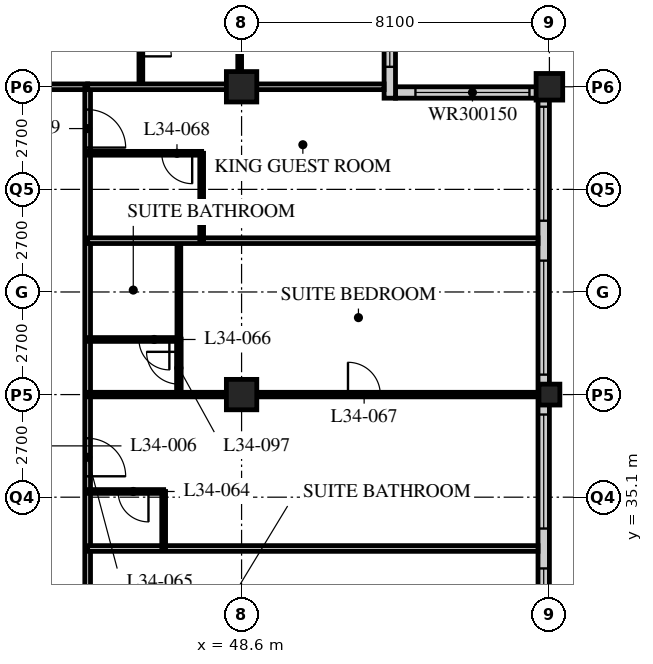
"""IFC4 building model, lengths in metres.
Left out: names, types, materials, properties, quantities, classifications, styles, units other than length and angle.
Written with IfcOpenShell. Run it as: python <this file> out.ifc"""

import sys

from ifc_helpers import new_model, si_unit, direction, frame, frame_2d, origin, origin_2d, place, context, subcontext, project, spatial, rectangle, hollow_rectangle, extrude, element, fill, save


model = new_model("IFC4")
c1 = context("Model", 3, precision=1e-05, world=origin(), true_north=direction((0.0, 1.0)))
c2 = subcontext(c1, "Body", "Model", "MODEL_VIEW")
j1 = project(units=[si_unit("LENGTHUNIT", "METRE"), si_unit("PLANEANGLEUNIT", "RADIAN")], contexts=[c1])
p1 = place(None, origin())
s1 = spatial("IfcSite", under=j1, at=p1, CompositionType="ELEMENT")
p2 = place(p1, origin())
s2 = spatial("IfcBuilding", under=s1, at=p2, CompositionType="ELEMENT")
p3 = place(p2, frame((0.0, 0.0, 134.0)))
s3 = spatial("IfcBuildingStorey", under=s2, at=p3, CompositionType="ELEMENT", Elevation=134.0)
for number, where, z_axis, x_axis in (
    (1, (48.6, 37.8, 0.0), (0.0, 0.0, 1.0), (1.0, 0.0, 0.0)),
    (2, (48.6, 45.9, 0.0), (0.0, 0.0, 1.0), (1.0, 0.0, 0.0)),
):
    element("IfcColumn", number, at=place(p3, frame(where, z_axis=z_axis, x_axis=x_axis)), inside=s3, PredefinedType="COLUMN", context=c2, shape_type="SweptSolid", body=[
        extrude(hollow_rectangle(XDim=0.8, YDim=0.8, WallThickness=0.08, at=origin_2d()), origin(), (0.0, 0.0, 1.0), 3.4),
    ])
p4 = place(p3, frame((56.7, 37.8, 0.0), z_axis=(0.0, 0.0, 1.0), x_axis=(1.0, 0.0, 0.0)))
e3 = element("IfcColumn", 3, at=p4, inside=s3, PredefinedType="COLUMN", context=c2, shape_type="SweptSolid", body=[
    extrude(hollow_rectangle(XDim=0.55, YDim=0.55, WallThickness=0.04, at=origin_2d()), origin(), (0.0, 0.0, 1.0), 3.4),
])
p5 = place(p3, frame((56.7, 45.9, 0.0), z_axis=(0.0, 0.0, 1.0), x_axis=(1.0, 0.0, 0.0)))
e4 = element("IfcColumn", 4, at=p5, inside=s3, PredefinedType="COLUMN", context=c2, shape_type="SweptSolid", body=[
    extrude(hollow_rectangle(XDim=0.7, YDim=0.7, WallThickness=0.07, at=origin_2d()), origin(), (0.0, 0.0, 1.0), 3.4),
])
p6 = place(p3, frame((56.55, 13.8, 0.0), z_axis=(0.0, 0.0, 1.0), x_axis=(0.0, 1.0, 0.0)))
e5 = element("IfcWall", 5, at=p6, inside=s3, PredefinedType="SOLIDWALL", context=c2, shape_type="SweptSolid", body=[
    extrude(rectangle(XDim=32.1, YDim=0.3, at=frame_2d((16.05, 0.0))), origin(), (0.0, 0.0, 1.0), 3.19),
])
p7 = place(p6, frame((0.225, 0.0, 0.9)))
e6 = element("IfcOpeningElement", 6, at=p7, cuts=e5, PredefinedType="OPENING", context=c2, shape_type="SweptSolid", body=[
    extrude(rectangle(XDim=3.0, YDim=2.0, at=frame_2d((1.5, 1.0))), frame((0.0, 0.16, 0.0), z_axis=(0.0, -1.0, 0.0), x_axis=(1.0, 0.0, 0.0)), (0.0, 0.0, 1.0), 0.32),
])
p8 = place(p6, frame((4.275, 0.0, 0.9)))
e7 = element("IfcOpeningElement", 7, at=p8, cuts=e5, PredefinedType="OPENING", context=c2, shape_type="SweptSolid", body=[
    extrude(rectangle(XDim=3.0, YDim=2.0, at=frame_2d((1.5, 1.0))), frame((0.0, 0.16, 0.0), z_axis=(0.0, -1.0, 0.0), x_axis=(1.0, 0.0, 0.0)), (0.0, 0.0, 1.0), 0.32),
])
p9 = place(p6, frame((8.325, 0.0, 0.9)))
e8 = element("IfcOpeningElement", 8, at=p9, cuts=e5, PredefinedType="OPENING", context=c2, shape_type="SweptSolid", body=[
    extrude(rectangle(XDim=3.0, YDim=2.0, at=frame_2d((1.5, 1.0))), frame((0.0, 0.16, 0.0), z_axis=(0.0, -1.0, 0.0), x_axis=(1.0, 0.0, 0.0)), (0.0, 0.0, 1.0), 0.32),
])
p10 = place(p6, frame((12.375, 0.0, 0.9)))
e9 = element("IfcOpeningElement", 9, at=p10, cuts=e5, PredefinedType="OPENING", context=c2, shape_type="SweptSolid", body=[
    extrude(rectangle(XDim=3.0, YDim=2.0, at=frame_2d((1.5, 1.0))), frame((0.0, 0.16, 0.0), z_axis=(0.0, -1.0, 0.0), x_axis=(1.0, 0.0, 0.0)), (0.0, 0.0, 1.0), 0.32),
])
p11 = place(p6, frame((16.425, 0.0, 0.9)))
e10 = element("IfcOpeningElement", 10, at=p11, cuts=e5, PredefinedType="OPENING", context=c2, shape_type="SweptSolid", body=[
    extrude(rectangle(XDim=3.0, YDim=2.0, at=frame_2d((1.5, 1.0))), frame((0.0, 0.16, 0.0), z_axis=(0.0, -1.0, 0.0), x_axis=(1.0, 0.0, 0.0)), (0.0, 0.0, 1.0), 0.32),
])
p12 = place(p6, frame((20.475, 0.0, 0.9)))
e11 = element("IfcOpeningElement", 11, at=p12, cuts=e5, PredefinedType="OPENING", context=c2, shape_type="SweptSolid", body=[
    extrude(rectangle(XDim=3.0, YDim=2.0, at=frame_2d((1.5, 1.0))), frame((0.0, 0.16, 0.0), z_axis=(0.0, -1.0, 0.0), x_axis=(1.0, 0.0, 0.0)), (0.0, 0.0, 1.0), 0.32),
])
p13 = place(p6, frame((24.525, 0.0, 0.9)))
e12 = element("IfcOpeningElement", 12, at=p13, cuts=e5, PredefinedType="OPENING", context=c2, shape_type="SweptSolid", body=[
    extrude(rectangle(XDim=3.0, YDim=2.0, at=frame_2d((1.5, 1.0))), frame((0.0, 0.16, 0.0), z_axis=(0.0, -1.0, 0.0), x_axis=(1.0, 0.0, 0.0)), (0.0, 0.0, 1.0), 0.32),
])
p14 = place(p6, frame((28.575, 0.0, 0.9)))
e13 = element("IfcOpeningElement", 13, at=p14, cuts=e5, PredefinedType="OPENING", context=c2, shape_type="SweptSolid", body=[
    extrude(rectangle(XDim=3.0, YDim=2.0, at=frame_2d((1.5, 1.0))), frame((0.0, 0.16, 0.0), z_axis=(0.0, -1.0, 0.0), x_axis=(1.0, 0.0, 0.0)), (0.0, 0.0, 1.0), 0.32),
])
p15 = place(p3, frame((56.4, 45.75, 0.0), z_axis=(0.0, 0.0, 1.0), x_axis=(-1.0, 0.0, 0.0)))
e14 = element("IfcWall", 14, at=p15, inside=s3, PredefinedType="SOLIDWALL", context=c2, shape_type="SweptSolid", body=[
    extrude(rectangle(XDim=3.75, YDim=0.3, at=frame_2d((1.875, 0.0))), origin(), (0.0, 0.0, 1.0), 3.19),
])
p16 = place(p15, frame((0.225, 0.0, 0.9)))
e15 = element("IfcOpeningElement", 15, at=p16, cuts=e14, PredefinedType="OPENING", context=c2, shape_type="SweptSolid", body=[
    extrude(rectangle(XDim=3.0, YDim=1.5, at=frame_2d((1.5, 0.75))), frame((0.0, 0.16, 0.0), z_axis=(0.0, -1.0, 0.0), x_axis=(1.0, 0.0, 0.0)), (0.0, 0.0, 1.0), 0.32),
])
p17 = place(p3, frame((52.5, 45.6, 0.0), z_axis=(0.0, 0.0, 1.0), x_axis=(0.0, 1.0, 0.0)))
e16 = element("IfcWall", 16, at=p17, inside=s3, PredefinedType="SOLIDWALL", context=c2, shape_type="SweptSolid", body=[
    extrude(rectangle(XDim=4.35, YDim=0.3, at=frame_2d((2.175, 0.0))), origin(), (0.0, 0.0, 1.0), 3.19),
])
p18 = place(p17, frame((0.825, 0.0, 0.9)))
e17 = element("IfcOpeningElement", 17, at=p18, cuts=e16, PredefinedType="OPENING", context=c2, shape_type="SweptSolid", body=[
    extrude(rectangle(XDim=3.0, YDim=1.5, at=frame_2d((1.5, 0.75))), frame((0.0, 0.16, 0.0), z_axis=(0.0, -1.0, 0.0), x_axis=(1.0, 0.0, 0.0)), (0.0, 0.0, 1.0), 0.32),
])
p19 = place(p3, frame((8.1, 45.9, 0.0), z_axis=(0.0, 0.0, 1.0), x_axis=(1.0, 0.0, 0.0)))
e18 = element("IfcWall", 18, at=p19, inside=s3, PredefinedType="PARTITIONING", context=c2, shape_type="SweptSolid", body=[
    extrude(rectangle(XDim=36.45, YDim=0.15, at=frame_2d((18.225, 0.0))), origin(), (0.0, 0.0, 1.0), 2.578),
])
p20 = place(p19, frame((9.625, 0.0, 0.0)))
e19 = element("IfcOpeningElement", 19, at=p20, cuts=e18, PredefinedType="OPENING", context=c2, shape_type="SweptSolid", body=[
    extrude(rectangle(XDim=1.0, YDim=2.1, at=frame_2d((0.5, 1.05))), frame((0.0, 0.085, 0.0), z_axis=(0.0, -1.0, 0.0), x_axis=(1.0, 0.0, 0.0)), (0.0, 0.0, 1.0), 0.17),
])
p21 = place(p19, frame((21.775, 0.0, 0.0)))
e20 = element("IfcOpeningElement", 20, at=p21, cuts=e18, PredefinedType="OPENING", context=c2, shape_type="SweptSolid", body=[
    extrude(rectangle(XDim=1.0, YDim=2.1, at=frame_2d((0.5, 1.05))), frame((0.0, 0.085, 0.0), z_axis=(0.0, -1.0, 0.0), x_axis=(1.0, 0.0, 0.0)), (0.0, 0.0, 1.0), 0.17),
])
p22 = place(p19, frame((28.95, 0.0, 0.0)))
e21 = element("IfcOpeningElement", 21, at=p22, cuts=e18, PredefinedType="OPENING", context=c2, shape_type="SweptSolid", body=[
    extrude(rectangle(XDim=1.0, YDim=2.1, at=frame_2d((0.5, 1.05))), frame((0.0, 0.085, 0.0), z_axis=(0.0, -1.0, 0.0), x_axis=(1.0, 0.0, 0.0)), (0.0, 0.0, 1.0), 0.17),
])
p23 = place(p19, frame((33.925, 0.0, 0.0)))
e22 = element("IfcOpeningElement", 22, at=p23, cuts=e18, PredefinedType="OPENING", context=c2, shape_type="SweptSolid", body=[
    extrude(rectangle(XDim=1.0, YDim=2.1, at=frame_2d((0.5, 1.05))), frame((0.0, 0.085, 0.0), z_axis=(0.0, -1.0, 0.0), x_axis=(1.0, 0.0, 0.0)), (0.0, 0.0, 1.0), 0.17),
])
p24 = place(p19, frame((2.625, 0.0, 0.0)))
e23 = element("IfcOpeningElement", 23, at=p24, cuts=e18, PredefinedType="OPENING", context=c2, shape_type="SweptSolid", body=[
    extrude(rectangle(XDim=1.0, YDim=2.1, at=frame_2d((0.5, 1.05))), frame((0.0, 0.085, 0.0), z_axis=(0.0, -1.0, 0.0), x_axis=(1.0, 0.0, 0.0)), (0.0, 0.0, 1.0), 0.17),
])
p25 = place(p3, frame((44.55, 17.55, 0.0), z_axis=(0.0, 0.0, 1.0), x_axis=(0.0, 1.0, 0.0)))
e24 = element("IfcWall", 24, at=p25, inside=s3, PredefinedType="PARTITIONING", context=c2, shape_type="SweptSolid", body=[
    extrude(rectangle(XDim=28.35, YDim=0.15, at=frame_2d((14.175, 0.0))), origin(), (0.0, 0.0, 1.0), 3.19),
])
p26 = place(p25, frame((2.75, 0.0, 0.0)))
e25 = element("IfcOpeningElement", 25, at=p26, cuts=e24, PredefinedType="OPENING", context=c2, shape_type="SweptSolid", body=[
    extrude(rectangle(XDim=1.0, YDim=2.1, at=frame_2d((0.5, 1.05))), frame((0.0, 0.085, 0.0), z_axis=(0.0, -1.0, 0.0), x_axis=(1.0, 0.0, 0.0)), (0.0, 0.0, 1.0), 0.17),
])
p27 = place(p25, frame((6.5, 0.0, 0.0)))
e26 = element("IfcOpeningElement", 26, at=p27, cuts=e24, PredefinedType="OPENING", context=c2, shape_type="SweptSolid", body=[
    extrude(rectangle(XDim=1.0, YDim=2.1, at=frame_2d((0.5, 1.05))), frame((0.0, 0.085, 0.0), z_axis=(0.0, -1.0, 0.0), x_axis=(1.0, 0.0, 0.0)), (0.0, 0.0, 1.0), 0.17),
])
p28 = place(p25, frame((13.55, 0.0, 0.0)))
e27 = element("IfcOpeningElement", 27, at=p28, cuts=e24, PredefinedType="OPENING", context=c2, shape_type="SweptSolid", body=[
    extrude(rectangle(XDim=1.0, YDim=2.1, at=frame_2d((0.5, 1.05))), frame((0.0, 0.085, 0.0), z_axis=(0.0, -1.0, 0.0), x_axis=(1.0, 0.0, 0.0)), (0.0, 0.0, 1.0), 0.17),
])
p29 = place(p25, frame((18.1, 0.0, 0.0)))
e28 = element("IfcOpeningElement", 28, at=p29, cuts=e24, PredefinedType="OPENING", context=c2, shape_type="SweptSolid", body=[
    extrude(rectangle(XDim=1.0, YDim=2.1, at=frame_2d((0.5, 1.05))), frame((0.0, 0.085, 0.0), z_axis=(0.0, -1.0, 0.0), x_axis=(1.0, 0.0, 0.0)), (0.0, 0.0, 1.0), 0.17),
])
p30 = place(p25, frame((26.75, 0.0, 0.0)))
e29 = element("IfcOpeningElement", 29, at=p30, cuts=e24, PredefinedType="OPENING", context=c2, shape_type="SweptSolid", body=[
    extrude(rectangle(XDim=1.0, YDim=2.1, at=frame_2d((0.5, 1.05))), frame((0.0, 0.085, 0.0), z_axis=(0.0, -1.0, 0.0), x_axis=(1.0, 0.0, 0.0)), (0.0, 0.0, 1.0), 0.17),
])
p31 = place(p3, frame((44.55, 33.75, 0.0), z_axis=(0.0, 0.0, 1.0), x_axis=(1.0, 0.0, 0.0)))
e30 = element("IfcWall", 30, at=p31, inside=s3, PredefinedType="PARTITIONING", context=c2, shape_type="SweptSolid", body=[
    extrude(rectangle(XDim=11.85, YDim=0.15, at=frame_2d((5.925, 0.0))), origin(), (0.0, 0.0, 1.0), 3.19),
])
p32 = place(p3, frame((46.55, 33.75, 0.0), z_axis=(0.0, 0.0, 1.0), x_axis=(0.0, 1.0, 0.0)))
e31 = element("IfcWall", 31, at=p32, inside=s3, PredefinedType="PARTITIONING", context=c2, shape_type="SweptSolid", body=[
    extrude(rectangle(XDim=1.5, YDim=0.1, at=frame_2d((0.75, 0.0))), origin(), (0.0, 0.0, 1.0), 3.19),
])
p33 = place(p3, frame((44.55, 35.25, 0.0), z_axis=(0.0, 0.0, 1.0), x_axis=(1.0, 0.0, 0.0)))
e32 = element("IfcWall", 32, at=p33, inside=s3, PredefinedType="PARTITIONING", context=c2, shape_type="SweptSolid", body=[
    extrude(rectangle(XDim=2.0, YDim=0.1, at=frame_2d((1.0, 0.0))), origin(), (0.0, 0.0, 1.0), 3.19),
])
p34 = place(p33, frame((0.8, 0.0, 0.0)))
e33 = element("IfcOpeningElement", 33, at=p34, cuts=e32, PredefinedType="OPENING", context=c2, shape_type="SweptSolid", body=[
    extrude(rectangle(XDim=0.8, YDim=2.1, at=frame_2d((0.4, 1.05))), frame((0.0, 0.06, 0.0), z_axis=(0.0, -1.0, 0.0), x_axis=(1.0, 0.0, 0.0)), (0.0, 0.0, 1.0), 0.12),
])
p35 = place(p3, frame((46.95, 39.25, 0.0), z_axis=(0.0, 0.0, 1.0), x_axis=(0.0, 1.0, 0.0)))
e34 = element("IfcWall", 34, at=p35, inside=s3, PredefinedType="PARTITIONING", context=c2, shape_type="SweptSolid", body=[
    extrude(rectangle(XDim=2.6, YDim=0.1, at=frame_2d((1.3, 0.0))), origin(), (0.0, 0.0, 1.0), 3.19),
])
p36 = place(p3, frame((44.55, 39.25, 0.0), z_axis=(0.0, 0.0, 1.0), x_axis=(1.0, 0.0, 0.0)))
e35 = element("IfcWall", 35, at=p36, inside=s3, PredefinedType="PARTITIONING", context=c2, shape_type="SweptSolid", body=[
    extrude(rectangle(XDim=2.4, YDim=0.1, at=frame_2d((1.2, 0.0))), origin(), (0.0, 0.0, 1.0), 3.19),
])
p37 = place(p36, frame((1.35, 0.0, 0.0)))
e36 = element("IfcOpeningElement", 36, at=p37, cuts=e35, PredefinedType="OPENING", context=c2, shape_type="SweptSolid", body=[
    extrude(rectangle(XDim=0.8, YDim=2.1, at=frame_2d((0.4, 1.05))), frame((0.0, 0.06, 0.0), z_axis=(0.0, -1.0, 0.0), x_axis=(1.0, 0.0, 0.0)), (0.0, 0.0, 1.0), 0.12),
])
p38 = place(p3, frame((44.55, 37.8, 0.0), z_axis=(0.0, 0.0, 1.0), x_axis=(1.0, 0.0, 0.0)))
e37 = element("IfcWall", 37, at=p38, inside=s3, PredefinedType="PARTITIONING", context=c2, shape_type="SweptSolid", body=[
    extrude(rectangle(XDim=11.85, YDim=0.12, at=frame_2d((5.925, 0.0))), origin(), (0.0, 0.0, 1.0), 2.578),
])
p39 = place(p38, frame((6.85, 0.0, 0.0)))
e38 = element("IfcOpeningElement", 38, at=p39, cuts=e37, PredefinedType="OPENING", context=c2, shape_type="SweptSolid", body=[
    extrude(rectangle(XDim=0.85, YDim=2.1, at=frame_2d((0.425, 1.05))), frame((0.0, 0.07, 0.0), z_axis=(0.0, -1.0, 0.0), x_axis=(1.0, 0.0, 0.0)), (0.0, 0.0, 1.0), 0.14),
])
p40 = place(p3, frame((44.55, 41.85, 0.0), z_axis=(0.0, 0.0, 1.0), x_axis=(1.0, 0.0, 0.0)))
e39 = element("IfcWall", 39, at=p40, inside=s3, PredefinedType="PARTITIONING", context=c2, shape_type="SweptSolid", body=[
    extrude(rectangle(XDim=11.85, YDim=0.15, at=frame_2d((5.925, 0.0))), origin(), (0.0, 0.0, 1.0), 3.19),
])
p41 = place(p3, frame((47.55, 41.85, 0.0), z_axis=(0.0, 0.0, 1.0), x_axis=(0.0, 1.0, 0.0)))
e40 = element("IfcWall", 40, at=p41, inside=s3, PredefinedType="PARTITIONING", context=c2, shape_type="SweptSolid", body=[
    extrude(rectangle(XDim=2.3, YDim=0.1, at=frame_2d((1.15, 0.0))), origin(), (0.0, 0.0, 1.0), 3.19),
])
p42 = place(p3, frame((44.55, 44.15, 0.0), z_axis=(0.0, 0.0, 1.0), x_axis=(1.0, 0.0, 0.0)))
e41 = element("IfcWall", 41, at=p42, inside=s3, PredefinedType="PARTITIONING", context=c2, shape_type="SweptSolid", body=[
    extrude(rectangle(XDim=3.0, YDim=0.1, at=frame_2d((1.5, 0.0))), origin(), (0.0, 0.0, 1.0), 3.19),
])
p43 = place(p42, frame((1.95, 0.0, 0.0)))
e42 = element("IfcOpeningElement", 42, at=p43, cuts=e41, PredefinedType="OPENING", context=c2, shape_type="SweptSolid", body=[
    extrude(rectangle(XDim=0.8, YDim=2.1, at=frame_2d((0.4, 1.05))), frame((0.0, 0.06, 0.0), z_axis=(0.0, -1.0, 0.0), x_axis=(1.0, 0.0, 0.0)), (0.0, 0.0, 1.0), 0.12),
])
p44 = place(p3, frame((45.95, 45.9, 0.0), z_axis=(0.0, 0.0, 1.0), x_axis=(0.0, 1.0, 0.0)))
e43 = element("IfcWall", 43, at=p44, inside=s3, PredefinedType="PARTITIONING", context=c2, shape_type="SweptSolid", body=[
    extrude(rectangle(XDim=2.4, YDim=0.1, at=frame_2d((1.2, 0.0))), origin(), (0.0, 0.0, 1.0), 3.19),
])
p45 = place(p44, frame((0.8, 0.0, 0.0)))
e44 = element("IfcOpeningElement", 44, at=p45, cuts=e43, PredefinedType="OPENING", context=c2, shape_type="SweptSolid", body=[
    extrude(rectangle(XDim=0.8, YDim=2.1, at=frame_2d((0.4, 1.05))), frame((0.0, 0.06, 0.0), z_axis=(0.0, -1.0, 0.0), x_axis=(1.0, 0.0, 0.0)), (0.0, 0.0, 1.0), 0.12),
])
p46 = place(p3, frame((48.55, 45.9, 0.0), z_axis=(0.0, 0.0, 1.0), x_axis=(0.0, 1.0, 0.0)))
e45 = element("IfcWall", 45, at=p46, inside=s3, PredefinedType="PARTITIONING", context=c2, shape_type="SweptSolid", body=[
    extrude(rectangle(XDim=2.4, YDim=0.1, at=frame_2d((1.2, 0.0))), origin(), (0.0, 0.0, 1.0), 2.578),
])
p47 = place(p3, frame((44.55, 45.9, 0.0), z_axis=(0.0, 0.0, 1.0), x_axis=(1.0, 0.0, 0.0)))
e46 = element("IfcWall", 46, at=p47, inside=s3, PredefinedType="PARTITIONING", context=c2, shape_type="SweptSolid", body=[
    extrude(rectangle(XDim=7.8, YDim=0.15, at=frame_2d((3.9, 0.0))), origin(), (0.0, 0.0, 1.0), 2.578),
])
p48 = place(p3, frame((46.95, 39.26, 0.0), z_axis=(0.0, 0.0, 1.0), x_axis=(0.0, -1.0, 0.0)))
e47 = element("IfcWall", 47, at=p48, inside=s3, PredefinedType="PARTITIONING", context=c2, shape_type="SweptSolid", body=[
    extrude(rectangle(XDim=1.46, YDim=0.12, at=frame_2d((0.73, 0.0))), origin(), (0.0, 0.0, 1.0), 3.19),
])
p49 = place(p48, frame((0.335, 0.0, 0.0)))
e48 = element("IfcOpeningElement", 48, at=p49, cuts=e47, PredefinedType="OPENING", context=c2, shape_type="SweptSolid", body=[
    extrude(rectangle(XDim=0.85, YDim=2.1, at=frame_2d((0.425, 1.05))), frame((0.0, 0.07, 0.0), z_axis=(0.0, -1.0, 0.0), x_axis=(1.0, 0.0, 0.0)), (0.0, 0.0, 1.0), 0.14),
])
p50 = place(p11, origin())
e49 = element("IfcWindow", 49, at=p50, inside=s3, PartitioningType="SINGLE_PANEL", PredefinedType="WINDOW", context=c2, shape_type="SweptSolid", body=[
    extrude(rectangle(XDim=3.0, YDim=2.0, at=frame_2d((1.5, 1.0))), frame((0.0, 0.03, 0.0), z_axis=(0.0, -1.0, 0.0), x_axis=(1.0, 0.0, 0.0)), (0.0, 0.0, 1.0), 0.06),
])
fill(e10, e49)
p51 = place(p12, origin())
e50 = element("IfcWindow", 50, at=p51, inside=s3, PartitioningType="SINGLE_PANEL", PredefinedType="WINDOW", context=c2, shape_type="SweptSolid", body=[
    extrude(rectangle(XDim=3.0, YDim=2.0, at=frame_2d((1.5, 1.0))), frame((0.0, 0.03, 0.0), z_axis=(0.0, -1.0, 0.0), x_axis=(1.0, 0.0, 0.0)), (0.0, 0.0, 1.0), 0.06),
])
fill(e11, e50)
p52 = place(p13, origin())
e51 = element("IfcWindow", 51, at=p52, inside=s3, PartitioningType="SINGLE_PANEL", PredefinedType="WINDOW", context=c2, shape_type="SweptSolid", body=[
    extrude(rectangle(XDim=3.0, YDim=2.0, at=frame_2d((1.5, 1.0))), frame((0.0, 0.03, 0.0), z_axis=(0.0, -1.0, 0.0), x_axis=(1.0, 0.0, 0.0)), (0.0, 0.0, 1.0), 0.06),
])
fill(e12, e51)
p53 = place(p14, origin())
e52 = element("IfcWindow", 52, at=p53, inside=s3, PartitioningType="SINGLE_PANEL", PredefinedType="WINDOW", context=c2, shape_type="SweptSolid", body=[
    extrude(rectangle(XDim=3.0, YDim=2.0, at=frame_2d((1.5, 1.0))), frame((0.0, 0.03, 0.0), z_axis=(0.0, -1.0, 0.0), x_axis=(1.0, 0.0, 0.0)), (0.0, 0.0, 1.0), 0.06),
])
fill(e13, e52)
p54 = place(p16, origin())
e53 = element("IfcWindow", 53, at=p54, inside=s3, PartitioningType="SINGLE_PANEL", PredefinedType="WINDOW", context=c2, shape_type="SweptSolid", body=[
    extrude(rectangle(XDim=3.0, YDim=1.5, at=frame_2d((1.5, 0.75))), frame((0.0, 0.03, 0.0), z_axis=(0.0, -1.0, 0.0), x_axis=(1.0, 0.0, 0.0)), (0.0, 0.0, 1.0), 0.06),
])
fill(e15, e53)
p55 = place(p18, origin())
e54 = element("IfcWindow", 54, at=p55, inside=s3, PartitioningType="SINGLE_PANEL", PredefinedType="WINDOW", context=c2, shape_type="SweptSolid", body=[
    extrude(rectangle(XDim=3.0, YDim=1.5, at=frame_2d((1.5, 0.75))), frame((0.0, 0.03, 0.0), z_axis=(0.0, -1.0, 0.0), x_axis=(1.0, 0.0, 0.0)), (0.0, 0.0, 1.0), 0.06),
])
fill(e17, e54)
p56 = place(p34, origin())
e55 = element("IfcDoor", 55, at=p56, inside=s3, OperationType="SINGLE_SWING_LEFT", PredefinedType="DOOR", context=c2, shape_type="SweptSolid", body=[
    extrude(rectangle(XDim=0.8, YDim=2.1, at=frame_2d((0.4, 1.05))), frame((0.0, 0.025, 0.0), z_axis=(0.0, -1.0, 0.0), x_axis=(1.0, 0.0, 0.0)), (0.0, 0.0, 1.0), 0.05),
])
fill(e33, e55)
p57 = place(p29, origin())
e56 = element("IfcDoor", 56, at=p57, inside=s3, OperationType="SINGLE_SWING_RIGHT", PredefinedType="DOOR", context=c2, shape_type="SweptSolid", body=[
    extrude(rectangle(XDim=1.0, YDim=2.1, at=frame_2d((0.5, 1.05))), frame((0.0, 0.025, 0.0), z_axis=(0.0, -1.0, 0.0), x_axis=(1.0, 0.0, 0.0)), (0.0, 0.0, 1.0), 0.05),
])
fill(e28, e56)
p58 = place(p37, origin())
e57 = element("IfcDoor", 57, at=p58, inside=s3, OperationType="SINGLE_SWING_LEFT", PredefinedType="DOOR", context=c2, shape_type="SweptSolid", body=[
    extrude(rectangle(XDim=0.8, YDim=2.1, at=frame_2d((0.4, 1.05))), frame((0.0, 0.025, 0.0), z_axis=(0.0, -1.0, 0.0), x_axis=(1.0, 0.0, 0.0)), (0.0, 0.0, 1.0), 0.05),
])
fill(e36, e57)
p59 = place(p39, origin())
e58 = element("IfcDoor", 58, at=p59, inside=s3, OperationType="SINGLE_SWING_LEFT", PredefinedType="DOOR", context=c2, shape_type="SweptSolid", body=[
    extrude(rectangle(XDim=0.85, YDim=2.1, at=frame_2d((0.425, 1.05))), frame((0.0, 0.025, 0.0), z_axis=(0.0, -1.0, 0.0), x_axis=(1.0, 0.0, 0.0)), (0.0, 0.0, 1.0), 0.05),
])
fill(e38, e58)
p60 = place(p43, origin())
e59 = element("IfcDoor", 59, at=p60, inside=s3, OperationType="SINGLE_SWING_LEFT", PredefinedType="DOOR", context=c2, shape_type="SweptSolid", body=[
    extrude(rectangle(XDim=0.8, YDim=2.1, at=frame_2d((0.4, 1.05))), frame((0.0, 0.025, 0.0), z_axis=(0.0, -1.0, 0.0), x_axis=(1.0, 0.0, 0.0)), (0.0, 0.0, 1.0), 0.05),
])
fill(e42, e59)
p61 = place(p30, origin())
e60 = element("IfcDoor", 60, at=p61, inside=s3, OperationType="SINGLE_SWING_RIGHT", PredefinedType="DOOR", context=c2, shape_type="SweptSolid", body=[
    extrude(rectangle(XDim=1.0, YDim=2.1, at=frame_2d((0.5, 1.05))), frame((0.0, 0.025, 0.0), z_axis=(0.0, -1.0, 0.0), x_axis=(1.0, 0.0, 0.0)), (0.0, 0.0, 1.0), 0.05),
])
fill(e29, e60)
p62 = place(p45, origin())
e61 = element("IfcDoor", 61, at=p62, inside=s3, OperationType="SINGLE_SWING_RIGHT", PredefinedType="DOOR", context=c2, shape_type="SweptSolid", body=[
    extrude(rectangle(XDim=0.8, YDim=2.1, at=frame_2d((0.4, 1.05))), frame((0.0, 0.025, 0.0), z_axis=(0.0, -1.0, 0.0), x_axis=(1.0, 0.0, 0.0)), (0.0, 0.0, 1.0), 0.05),
])
fill(e44, e61)
p63 = place(p49, origin())
e62 = element("IfcDoor", 62, at=p63, inside=s3, OperationType="SINGLE_SWING_RIGHT", PredefinedType="DOOR", context=c2, shape_type="SweptSolid", body=[
    extrude(rectangle(XDim=0.85, YDim=2.1, at=frame_2d((0.425, 1.05))), frame((0.0, 0.025, 0.0), z_axis=(0.0, -1.0, 0.0), x_axis=(1.0, 0.0, 0.0)), (0.0, 0.0, 1.0), 0.05),
])
fill(e48, e62)
save(model, sys.argv[1])
